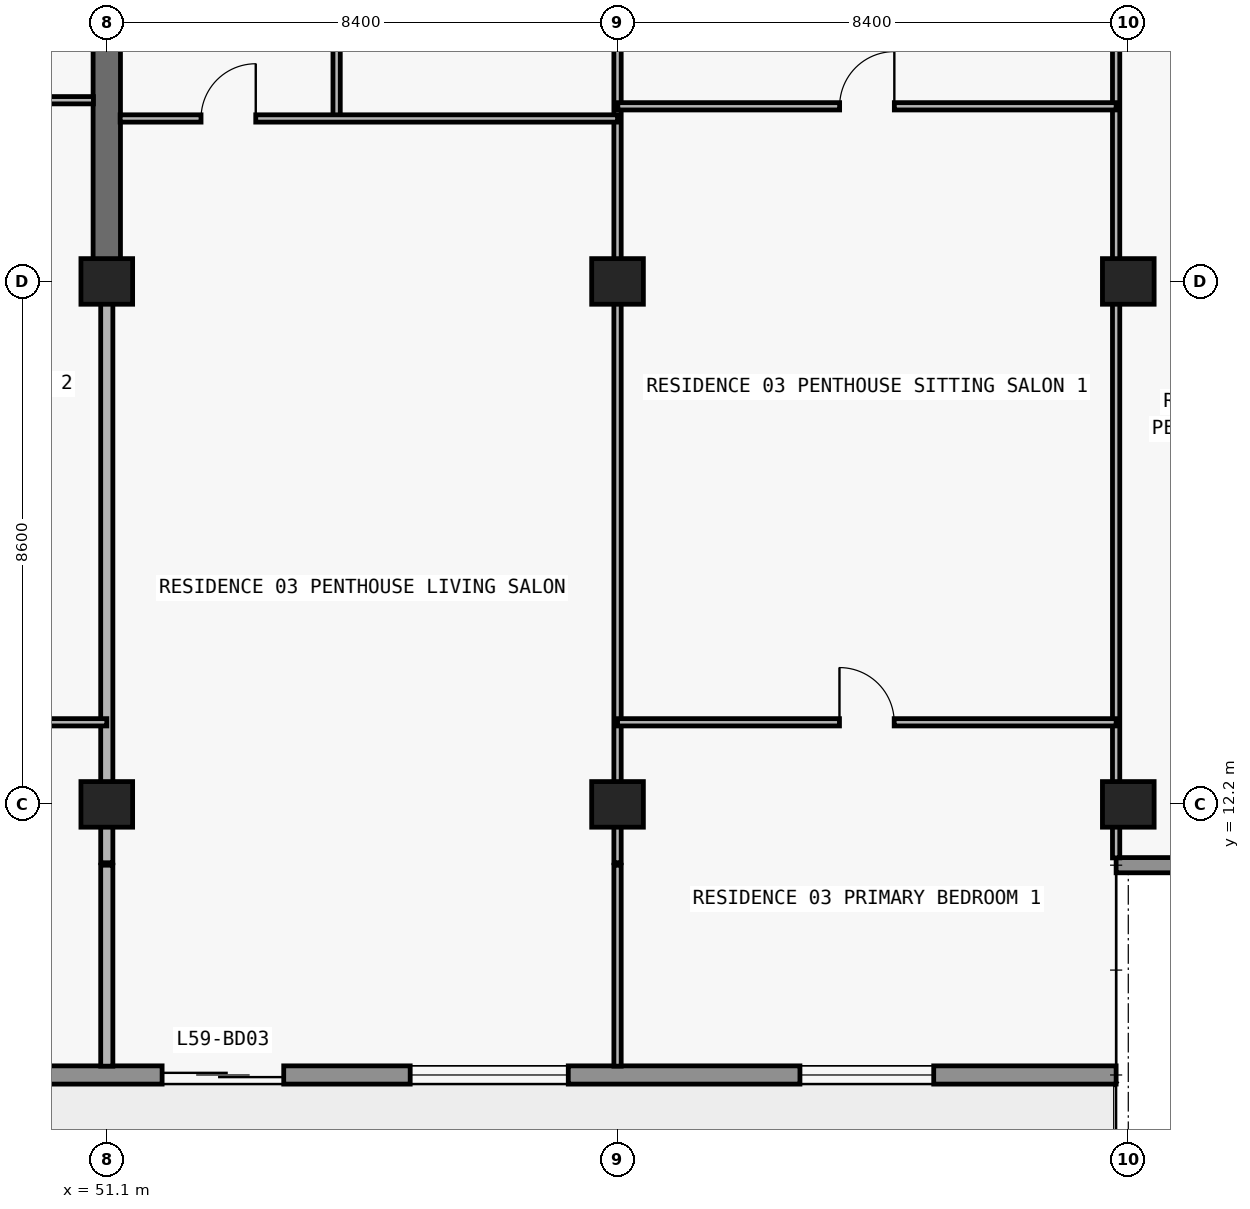
"""IFC4 building model, lengths in metres.
Left out: names, types, materials, properties, quantities, classifications, styles, units other than length and angle.
Written with IfcOpenShell. Run it as: python <this file> out.ifc"""

import sys

from ifc_helpers import new_model, si_unit, direction, frame, frame_2d, origin, origin_2d, place, context, subcontext, project, spatial, rectangle, extrude, element, fill, save


model = new_model("IFC4")
c1 = context("Model", 3, precision=1e-05, world=origin(), true_north=direction((0.0, 1.0)))
c2 = subcontext(c1, "Body", "Model", "MODEL_VIEW")
j1 = project(units=[si_unit("LENGTHUNIT", "METRE"), si_unit("PLANEANGLEUNIT", "RADIAN")], contexts=[c1])
p1 = place(None, origin())
s1 = spatial("IfcSite", under=j1, at=p1, CompositionType="ELEMENT")
p2 = place(p1, origin())
s2 = spatial("IfcBuilding", under=s1, at=p2, CompositionType="ELEMENT")
p3 = place(p2, frame((0.0, 0.0, 211.5)))
s3 = spatial("IfcBuildingStorey", under=s2, at=p3, CompositionType="ELEMENT", Elevation=211.5)
for number, where, z_axis, x_axis in (
    (1, (51.1, 12.2, 0.0), (0.0, 0.0, 1.0), (1.0, 0.0, 0.0)),
    (2, (59.5, 12.2, 0.0), (0.0, 0.0, 1.0), (1.0, 0.0, 0.0)),
    (3, (67.9, 12.2, 0.0), (0.0, 0.0, 1.0), (1.0, 0.0, 0.0)),
    (4, (51.1, 20.8, 0.0), (0.0, 0.0, 1.0), (1.0, 0.0, 0.0)),
    (5, (59.5, 20.8, 0.0), (0.0, 0.0, 1.0), (1.0, 0.0, 0.0)),
    (6, (67.9, 20.8, 0.0), (0.0, 0.0, 1.0), (1.0, 0.0, 0.0)),
):
    element("IfcColumn", number, at=place(p3, frame(where, z_axis=z_axis, x_axis=x_axis)), inside=s3, PredefinedType="COLUMN", context=c2, shape_type="SweptSolid", body=[
        extrude(rectangle(XDim=0.85, YDim=0.75, at=origin_2d()), origin(), (0.0, 0.0, 1.0), 3.05),
    ])
p4 = place(p3, frame((51.1, 20.8, 0.0), z_axis=(0.0, 0.0, 1.0), x_axis=(0.0, 1.0, 0.0)))
e7 = element("IfcWall", 7, at=p4, inside=s3, PredefinedType="SHEAR", context=c2, shape_type="SweptSolid", body=[
    extrude(rectangle(XDim=8.6, YDim=0.45, at=frame_2d((4.3, 0.0))), origin(), (0.0, 0.0, 1.0), 3.05),
])
p5 = place(p3, frame((67.7, 7.75, 0.0), z_axis=(0.0, 0.0, 1.0), x_axis=(-1.0, 0.0, 0.0)))
e8 = element("IfcWall", 8, at=p5, inside=s3, PredefinedType="STANDARD", context=c2, shape_type="SweptSolid", body=[
    extrude(rectangle(XDim=57.6, YDim=0.3, at=frame_2d((28.8, 0.0))), origin(), (0.0, 0.0, 1.0), 3.05),
])
p6 = place(p5, frame((54.69, 0.0, 0.0)))
e9 = element("IfcOpeningElement", 9, at=p6, cuts=e8, PredefinedType="OPENING", context=c2, shape_type="SweptSolid", body=[
    extrude(rectangle(XDim=2.0, YDim=2.3, at=frame_2d((1.0, 1.15))), frame((0.0, 0.16, 0.0), z_axis=(0.0, -1.0, 0.0), x_axis=(1.0, 0.0, 0.0)), (0.0, 0.0, 1.0), 0.32),
])
p7 = place(p5, frame((50.21, 0.0, 0.65)))
e10 = element("IfcOpeningElement", 10, at=p7, cuts=e8, PredefinedType="OPENING", context=c2, shape_type="SweptSolid", body=[
    extrude(rectangle(XDim=2.6, YDim=1.85, at=frame_2d((1.3, 0.925))), frame((0.0, 0.16, 0.0), z_axis=(0.0, -1.0, 0.0), x_axis=(1.0, 0.0, 0.0)), (0.0, 0.0, 1.0), 0.32),
])
p8 = place(p5, frame((44.1, 0.0, 0.85)))
e11 = element("IfcOpeningElement", 11, at=p8, cuts=e8, PredefinedType="OPENING", context=c2, shape_type="SweptSolid", body=[
    extrude(rectangle(XDim=2.2, YDim=1.55, at=frame_2d((1.1, 0.775))), frame((0.0, 0.16, 0.0), z_axis=(0.0, -1.0, 0.0), x_axis=(1.0, 0.0, 0.0)), (0.0, 0.0, 1.0), 0.32),
])
p9 = place(p5, frame((38.09, 0.0, 0.0)))
e12 = element("IfcOpeningElement", 12, at=p9, cuts=e8, PredefinedType="OPENING", context=c2, shape_type="SweptSolid", body=[
    extrude(rectangle(XDim=2.0, YDim=2.3, at=frame_2d((1.0, 1.15))), frame((0.0, 0.16, 0.0), z_axis=(0.0, -1.0, 0.0), x_axis=(1.0, 0.0, 0.0)), (0.0, 0.0, 1.0), 0.32),
])
p10 = place(p5, frame((33.41, 0.0, 0.65)))
e13 = element("IfcOpeningElement", 13, at=p10, cuts=e8, PredefinedType="OPENING", context=c2, shape_type="SweptSolid", body=[
    extrude(rectangle(XDim=2.6, YDim=1.85, at=frame_2d((1.3, 0.925))), frame((0.0, 0.16, 0.0), z_axis=(0.0, -1.0, 0.0), x_axis=(1.0, 0.0, 0.0)), (0.0, 0.0, 1.0), 0.32),
])
p11 = place(p5, frame((27.7, 0.0, 0.85)))
e14 = element("IfcOpeningElement", 14, at=p11, cuts=e8, PredefinedType="OPENING", context=c2, shape_type="SweptSolid", body=[
    extrude(rectangle(XDim=2.2, YDim=1.55, at=frame_2d((1.1, 0.775))), frame((0.0, 0.16, 0.0), z_axis=(0.0, -1.0, 0.0), x_axis=(1.0, 0.0, 0.0)), (0.0, 0.0, 1.0), 0.32),
])
p12 = place(p5, frame((19.7, 0.0, 0.85)))
e15 = element("IfcOpeningElement", 15, at=p12, cuts=e8, PredefinedType="OPENING", context=c2, shape_type="SweptSolid", body=[
    extrude(rectangle(XDim=2.2, YDim=1.55, at=frame_2d((1.1, 0.775))), frame((0.0, 0.16, 0.0), z_axis=(0.0, -1.0, 0.0), x_axis=(1.0, 0.0, 0.0)), (0.0, 0.0, 1.0), 0.32),
])
p13 = place(p5, frame((13.69, 0.0, 0.0)))
e16 = element("IfcOpeningElement", 16, at=p13, cuts=e8, PredefinedType="OPENING", context=c2, shape_type="SweptSolid", body=[
    extrude(rectangle(XDim=2.0, YDim=2.3, at=frame_2d((1.0, 1.15))), frame((0.0, 0.16, 0.0), z_axis=(0.0, -1.0, 0.0), x_axis=(1.0, 0.0, 0.0)), (0.0, 0.0, 1.0), 0.32),
])
p14 = place(p5, frame((9.01, 0.0, 0.65)))
e17 = element("IfcOpeningElement", 17, at=p14, cuts=e8, PredefinedType="OPENING", context=c2, shape_type="SweptSolid", body=[
    extrude(rectangle(XDim=2.6, YDim=1.85, at=frame_2d((1.3, 0.925))), frame((0.0, 0.16, 0.0), z_axis=(0.0, -1.0, 0.0), x_axis=(1.0, 0.0, 0.0)), (0.0, 0.0, 1.0), 0.32),
])
p15 = place(p5, frame((3.0, 0.0, 0.85)))
e18 = element("IfcOpeningElement", 18, at=p15, cuts=e8, PredefinedType="OPENING", context=c2, shape_type="SweptSolid", body=[
    extrude(rectangle(XDim=2.2, YDim=1.55, at=frame_2d((1.1, 0.775))), frame((0.0, 0.16, 0.0), z_axis=(0.0, -1.0, 0.0), x_axis=(1.0, 0.0, 0.0)), (0.0, 0.0, 1.0), 0.32),
])
p16 = place(p3, frame((67.7, 11.2, 0.0), z_axis=(0.0, 0.0, 1.0), x_axis=(1.0, 0.0, 0.0)))
e19 = element("IfcWall", 19, at=p16, inside=s3, PredefinedType="ELEMENTEDWALL", context=c2, shape_type="SweptSolid", body=[
    extrude(rectangle(XDim=3.85, YDim=0.25, at=frame_2d((1.925, 0.0))), origin(), (0.0, 0.0, 1.0), 3.05),
])
p17 = place(p3, frame((51.1, 7.895, 0.0), z_axis=(0.0, 0.0, 1.0), x_axis=(0.0, 1.0, 0.0)))
e20 = element("IfcWall", 20, at=p17, inside=s3, PredefinedType="PARTITIONING", context=c2, shape_type="SweptSolid", body=[
    extrude(rectangle(XDim=3.305, YDim=0.2, at=frame_2d((1.652, 0.0))), origin(), (0.0, 0.0, 1.0), 3.05),
])
p18 = place(p3, frame((51.1, 11.24, 0.0), z_axis=(0.0, 0.0, 1.0), x_axis=(0.0, 1.0, 0.0)))
e21 = element("IfcWall", 21, at=p18, inside=s3, PredefinedType="PARTITIONING", context=c2, shape_type="SweptSolid", body=[
    extrude(rectangle(XDim=9.555, YDim=0.2, at=frame_2d((4.777, 0.0))), origin(), (0.0, 0.0, 1.0), 2.263),
])
p19 = place(p3, frame((54.88, 23.48, 0.0), z_axis=(0.0, 0.0, 1.0), x_axis=(0.0, 1.0, 0.0)))
e22 = element("IfcWall", 22, at=p19, inside=s3, PredefinedType="PARTITIONING", context=c2, shape_type="SweptSolid", body=[
    extrude(rectangle(XDim=4.8, YDim=0.12, at=frame_2d((2.4, 0.0))), origin(), (0.0, 0.0, 1.0), 3.05),
])
p20 = place(p19, frame((1.95, 0.0, 0.0)))
e23 = element("IfcOpeningElement", 23, at=p20, cuts=e22, PredefinedType="OPENING", context=c2, shape_type="SweptSolid", body=[
    extrude(rectangle(XDim=0.9, YDim=2.15, at=frame_2d((0.45, 1.075))), frame((0.0, 0.07, 0.0), z_axis=(0.0, -1.0, 0.0), x_axis=(1.0, 0.0, 0.0)), (0.0, 0.0, 1.0), 0.14),
])
p21 = place(p3, frame((59.5, 7.895, 0.0), z_axis=(0.0, 0.0, 1.0), x_axis=(0.0, 1.0, 0.0)))
e24 = element("IfcWall", 24, at=p21, inside=s3, PredefinedType="PARTITIONING", context=c2, shape_type="SweptSolid", body=[
    extrude(rectangle(XDim=3.305, YDim=0.12, at=frame_2d((1.652, 0.0))), origin(), (0.0, 0.0, 1.0), 3.05),
])
p22 = place(p3, frame((59.5, 11.24, 0.0), z_axis=(0.0, 0.0, 1.0), x_axis=(0.0, 1.0, 0.0)))
e25 = element("IfcWall", 25, at=p22, inside=s3, PredefinedType="PARTITIONING", context=c2, shape_type="SweptSolid", body=[
    extrude(rectangle(XDim=22.76, YDim=0.12, at=frame_2d((11.38, 0.0))), origin(), (0.0, 0.0, 1.0), 2.263),
])
p23 = place(p22, frame((14.19, 0.0, 0.0)))
e26 = element("IfcOpeningElement", 26, at=p23, cuts=e25, PredefinedType="OPENING", context=c2, shape_type="SweptSolid", body=[
    extrude(rectangle(XDim=0.9, YDim=2.15, at=frame_2d((0.45, 1.075))), frame((0.0, 0.07, 0.0), z_axis=(0.0, -1.0, 0.0), x_axis=(1.0, 0.0, 0.0)), (0.0, 0.0, 1.0), 0.14),
])
p24 = place(p3, frame((67.7, 11.32, 0.0), z_axis=(0.0, 0.0, 1.0), x_axis=(0.0, 1.0, 0.0)))
e27 = element("IfcWall", 27, at=p24, inside=s3, PredefinedType="PARTITIONING", context=c2, shape_type="SweptSolid", body=[
    extrude(rectangle(XDim=22.68, YDim=0.12, at=frame_2d((11.34, 0.0))), origin(), (0.0, 0.0, 1.0), 2.263),
])
p25 = place(p24, frame((14.11, 0.0, 0.0)))
e28 = element("IfcOpeningElement", 28, at=p25, cuts=e27, PredefinedType="OPENING", context=c2, shape_type="SweptSolid", body=[
    extrude(rectangle(XDim=0.9, YDim=2.15, at=frame_2d((0.45, 1.075))), frame((0.0, 0.07, 0.0), z_axis=(0.0, -1.0, 0.0), x_axis=(1.0, 0.0, 0.0)), (0.0, 0.0, 1.0), 0.14),
])
p26 = place(p3, frame((35.1, 13.55, 0.0), z_axis=(0.0, 0.0, 1.0), x_axis=(1.0, 0.0, 0.0)))
e29 = element("IfcWall", 29, at=p26, inside=s3, PredefinedType="PARTITIONING", context=c2, shape_type="SweptSolid", body=[
    extrude(rectangle(XDim=16.0, YDim=0.12, at=frame_2d((8.0, 0.0))), origin(), (0.0, 0.0, 1.0), 3.05),
])
p27 = place(p26, frame((3.35, 0.0, 0.0)))
e30 = element("IfcOpeningElement", 30, at=p27, cuts=e29, PredefinedType="OPENING", context=c2, shape_type="SweptSolid", body=[
    extrude(rectangle(XDim=0.9, YDim=2.15, at=frame_2d((0.45, 1.075))), frame((0.0, 0.07, 0.0), z_axis=(0.0, -1.0, 0.0), x_axis=(1.0, 0.0, 0.0)), (0.0, 0.0, 1.0), 0.14),
])
p28 = place(p26, frame((11.35, 0.0, 0.0)))
e31 = element("IfcOpeningElement", 31, at=p28, cuts=e29, PredefinedType="OPENING", context=c2, shape_type="SweptSolid", body=[
    extrude(rectangle(XDim=0.9, YDim=2.15, at=frame_2d((0.45, 1.075))), frame((0.0, 0.07, 0.0), z_axis=(0.0, -1.0, 0.0), x_axis=(1.0, 0.0, 0.0)), (0.0, 0.0, 1.0), 0.14),
])
p29 = place(p3, frame((59.5, 13.55, 0.0), z_axis=(0.0, 0.0, 1.0), x_axis=(1.0, 0.0, 0.0)))
e32 = element("IfcWall", 32, at=p29, inside=s3, PredefinedType="PARTITIONING", context=c2, shape_type="SweptSolid", body=[
    extrude(rectangle(XDim=8.2, YDim=0.12, at=frame_2d((4.1, 0.0))), origin(), (0.0, 0.0, 1.0), 3.05),
])
p30 = place(p29, frame((3.65, 0.0, 0.0)))
e33 = element("IfcOpeningElement", 33, at=p30, cuts=e32, PredefinedType="OPENING", context=c2, shape_type="SweptSolid", body=[
    extrude(rectangle(XDim=0.9, YDim=2.15, at=frame_2d((0.45, 1.075))), frame((0.0, 0.07, 0.0), z_axis=(0.0, -1.0, 0.0), x_axis=(1.0, 0.0, 0.0)), (0.0, 0.0, 1.0), 0.14),
])
p31 = place(p3, frame((51.32, 23.48, 0.0), z_axis=(0.0, 0.0, 1.0), x_axis=(1.0, 0.0, 0.0)))
e34 = element("IfcWall", 34, at=p31, inside=s3, PredefinedType="PARTITIONING", context=c2, shape_type="SweptSolid", body=[
    extrude(rectangle(XDim=8.18, YDim=0.12, at=frame_2d((4.09, 0.0))), origin(), (0.0, 0.0, 1.0), 3.05),
])
p32 = place(p31, frame((1.33, 0.0, 0.0)))
e35 = element("IfcOpeningElement", 35, at=p32, cuts=e34, PredefinedType="OPENING", context=c2, shape_type="SweptSolid", body=[
    extrude(rectangle(XDim=0.9, YDim=2.15, at=frame_2d((0.45, 1.075))), frame((0.0, 0.07, 0.0), z_axis=(0.0, -1.0, 0.0), x_axis=(1.0, 0.0, 0.0)), (0.0, 0.0, 1.0), 0.14),
])
p33 = place(p3, frame((59.505, 23.68, 0.0), z_axis=(0.0, 0.0, 1.0), x_axis=(1.0, 0.0, 0.0)))
e36 = element("IfcWall", 36, at=p33, inside=s3, PredefinedType="PARTITIONING", context=c2, shape_type="SweptSolid", body=[
    extrude(rectangle(XDim=8.195, YDim=0.12, at=frame_2d((4.098, 0.0))), origin(), (0.0, 0.0, 1.0), 3.05),
])
p34 = place(p33, frame((3.647, 0.0, 0.0)))
e37 = element("IfcOpeningElement", 37, at=p34, cuts=e36, PredefinedType="OPENING", context=c2, shape_type="SweptSolid", body=[
    extrude(rectangle(XDim=0.9, YDim=2.15, at=frame_2d((0.45, 1.075))), frame((0.0, 0.07, 0.0), z_axis=(0.0, -1.0, 0.0), x_axis=(1.0, 0.0, 0.0)), (0.0, 0.0, 1.0), 0.14),
])
p35 = place(p3, frame((42.7, 23.78, 0.0), z_axis=(0.0, 0.0, 1.0), x_axis=(1.0, 0.0, 0.0)))
e38 = element("IfcWall", 38, at=p35, inside=s3, PredefinedType="PARTITIONING", context=c2, shape_type="SweptSolid", body=[
    extrude(rectangle(XDim=8.18, YDim=0.12, at=frame_2d((4.09, 0.0))), origin(), (0.0, 0.0, 1.0), 3.05),
])
p36 = place(p35, frame((3.64, 0.0, 0.0)))
e39 = element("IfcOpeningElement", 39, at=p36, cuts=e38, PredefinedType="OPENING", context=c2, shape_type="SweptSolid", body=[
    extrude(rectangle(XDim=0.9, YDim=2.15, at=frame_2d((0.45, 1.075))), frame((0.0, 0.07, 0.0), z_axis=(0.0, -1.0, 0.0), x_axis=(1.0, 0.0, 0.0)), (0.0, 0.0, 1.0), 0.14),
])
p37 = place(p13, origin())
e40 = element("IfcDoor", 40, at=p37, inside=s3, OperationType="DOUBLE_DOOR_SLIDING", PredefinedType="DOOR", context=c2, shape_type="SweptSolid", body=[
    extrude(rectangle(XDim=2.0, YDim=2.3, at=frame_2d((1.0, 1.15))), frame((0.0, 0.025, 0.0), z_axis=(0.0, -1.0, 0.0), x_axis=(1.0, 0.0, 0.0)), (0.0, 0.0, 1.0), 0.05),
])
fill(e16, e40)
p38 = place(p14, origin())
e41 = element("IfcWindow", 41, at=p38, inside=s3, PartitioningType="SINGLE_PANEL", PredefinedType="WINDOW", context=c2, shape_type="SweptSolid", body=[
    extrude(rectangle(XDim=2.6, YDim=1.85, at=frame_2d((1.3, 0.925))), frame((0.0, 0.03, 0.0), z_axis=(0.0, -1.0, 0.0), x_axis=(1.0, 0.0, 0.0)), (0.0, 0.0, 1.0), 0.06),
])
fill(e17, e41)
p39 = place(p15, origin())
e42 = element("IfcWindow", 42, at=p39, inside=s3, PartitioningType="SINGLE_PANEL", PredefinedType="WINDOW", context=c2, shape_type="SweptSolid", body=[
    extrude(rectangle(XDim=2.2, YDim=1.55, at=frame_2d((1.1, 0.775))), frame((0.0, 0.03, 0.0), z_axis=(0.0, -1.0, 0.0), x_axis=(1.0, 0.0, 0.0)), (0.0, 0.0, 1.0), 0.06),
])
fill(e18, e42)
p40 = place(p32, origin())
e43 = element("IfcDoor", 43, at=p40, inside=s3, OperationType="SINGLE_SWING_RIGHT", PredefinedType="DOOR", context=c2, shape_type="SweptSolid", body=[
    extrude(rectangle(XDim=0.9, YDim=2.15, at=frame_2d((0.45, 1.075))), frame((0.0, 0.025, 0.0), z_axis=(0.0, -1.0, 0.0), x_axis=(1.0, 0.0, 0.0)), (0.0, 0.0, 1.0), 0.05),
])
fill(e35, e43)
p41 = place(p34, origin())
e44 = element("IfcDoor", 44, at=p41, inside=s3, OperationType="SINGLE_SWING_RIGHT", PredefinedType="DOOR", context=c2, shape_type="SweptSolid", body=[
    extrude(rectangle(XDim=0.9, YDim=2.15, at=frame_2d((0.45, 1.075))), frame((0.0, 0.025, 0.0), z_axis=(0.0, -1.0, 0.0), x_axis=(1.0, 0.0, 0.0)), (0.0, 0.0, 1.0), 0.05),
])
fill(e37, e44)
p42 = place(p30, origin())
e45 = element("IfcDoor", 45, at=p42, inside=s3, OperationType="SINGLE_SWING_LEFT", PredefinedType="DOOR", context=c2, shape_type="SweptSolid", body=[
    extrude(rectangle(XDim=0.9, YDim=2.15, at=frame_2d((0.45, 1.075))), frame((0.0, 0.025, 0.0), z_axis=(0.0, -1.0, 0.0), x_axis=(1.0, 0.0, 0.0)), (0.0, 0.0, 1.0), 0.05),
])
fill(e33, e45)
save(model, sys.argv[1])
